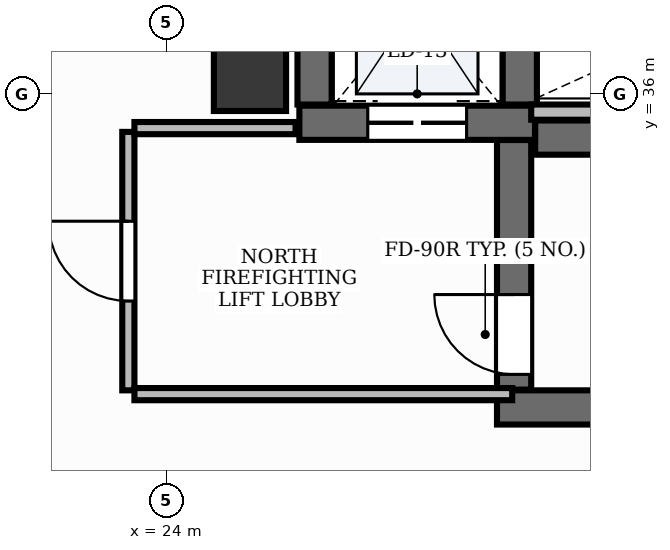
"""IFC4 building model, lengths in metres.
Left out: names, types, materials, properties, quantities, classifications, styles, units other than length and angle.
Written with IfcOpenShell. Run it as: python <this file> out.ifc"""

import sys

from ifc_helpers import new_model, si_unit, direction, frame, frame_2d, origin, origin_2d, place, context, subcontext, project, spatial, rectangle, extrude, element, fill, save


model = new_model("IFC4")
c1 = context("Model", 3, precision=1e-05, world=origin(), true_north=direction((0.0, 1.0)))
c2 = subcontext(c1, "Body", "Model", "MODEL_VIEW")
j1 = project(units=[si_unit("LENGTHUNIT", "METRE"), si_unit("PLANEANGLEUNIT", "RADIAN")], contexts=[c1])
p1 = place(None, origin())
s1 = spatial("IfcSite", under=j1, at=p1, CompositionType="ELEMENT")
p2 = place(p1, origin())
s2 = spatial("IfcBuilding", under=s1, at=p2, CompositionType="ELEMENT")
p3 = place(p2, frame((0.0, 0.0, 51.0)))
s3 = spatial("IfcBuildingStorey", under=s2, at=p3, CompositionType="ELEMENT", Elevation=51.0)
p4 = place(p3, frame((28.852, 35.425, 0.0), z_axis=(0.0, 0.0, 1.0), x_axis=(1.0, 0.0, 0.0)))
e1 = element("IfcWall", 1, at=p4, inside=s3, PredefinedType="SHEAR", context=c2, shape_type="SweptSolid", body=[
    extrude(rectangle(XDim=8.248, YDim=0.45, at=frame_2d((4.124, 0.0))), origin(), (0.0, 0.0, 1.0), 3.9),
])
p5 = place(p3, frame((28.35, 31.875, 0.0), z_axis=(0.0, 0.0, 1.0), x_axis=(1.0, 0.0, 0.0)))
e2 = element("IfcWall", 2, at=p5, inside=s3, PredefinedType="SHEAR", context=c2, shape_type="SweptSolid", body=[
    extrude(rectangle(XDim=8.75, YDim=0.45, at=frame_2d((4.375, 0.0))), origin(), (0.0, 0.0, 1.0), 3.9),
])
p6 = place(p3, frame((28.575, 32.11, 0.0), z_axis=(0.0, 0.0, 1.0), x_axis=(0.0, 1.0, 0.0)))
e3 = element("IfcWall", 3, at=p6, inside=s3, PredefinedType="SHEAR", context=c2, shape_type="SweptSolid", body=[
    extrude(rectangle(XDim=3.283, YDim=0.45, at=frame_2d((1.642, 0.0))), origin(), (0.0, 0.0, 1.0), 3.9),
])
p7 = place(p6, frame((0.2, 0.0, 0.0)))
e4 = element("IfcOpeningElement", 4, at=p7, cuts=e3, PredefinedType="OPENING", context=c2, shape_type="SweptSolid", body=[
    extrude(rectangle(XDim=1.05, YDim=2.15, at=frame_2d((0.525, 1.075))), frame((0.0, 0.24, 0.0), z_axis=(0.0, -1.0, 0.0), x_axis=(1.0, 0.0, 0.0)), (0.0, 0.0, 1.0), 0.48),
])
p8 = place(p3, frame((25.75, 35.62, 0.0), z_axis=(0.0, 0.0, 1.0), x_axis=(1.0, 0.0, 0.0)))
e5 = element("IfcWall", 5, at=p8, inside=s3, PredefinedType="SHEAR", context=c2, shape_type="SweptSolid", body=[
    extrude(rectangle(XDim=3.1, YDim=0.45, at=frame_2d((1.55, 0.0))), origin(), (0.0, 0.0, 1.0), 3.9),
])
p9 = place(p8, frame((0.9, 0.0, 0.0)))
e6 = element("IfcOpeningElement", 6, at=p9, cuts=e5, PredefinedType="OPENING", context=c2, shape_type="SweptSolid", body=[
    extrude(rectangle(XDim=1.3, YDim=2.2, at=frame_2d((0.65, 1.1))), frame((0.0, 0.24, 0.0), z_axis=(0.0, -1.0, 0.0), x_axis=(1.0, 0.0, 0.0)), (0.0, 0.0, 1.0), 0.48),
])
for number, where, z_axis, x_axis in (
    (7, (25.95, 35.86, 0.0), (0.0, 0.0, 1.0), (0.0, 1.0, 0.0)),
    (8, (28.65, 35.86, 0.0), (0.0, 0.0, 1.0), (0.0, 1.0, 0.0)),
):
    element("IfcWall", number, at=place(p3, frame(where, z_axis=z_axis, x_axis=x_axis)), inside=s3, PredefinedType="SHEAR", context=c2, shape_type="SweptSolid", body=[
        extrude(rectangle(XDim=2.7, YDim=0.45, at=frame_2d((1.35, 0.0))), origin(), (0.0, 0.0, 1.0), 3.9),
    ])
p10 = place(p3, frame((25.1, 36.25, -0.0), z_axis=(0.0, 0.0, 1.0), x_axis=(1.0, 0.0, 0.0)))
e9 = element("IfcColumn", 9, at=p10, inside=s3, PredefinedType="PILASTER", context=c2, shape_type="SweptSolid", body=[
    extrude(rectangle(XDim=0.95, YDim=0.95, at=origin_2d()), origin(), (0.0, 0.0, 1.0), 3.901),
])
p11 = place(p3, frame((28.8, 35.76, 0.0), z_axis=(0.0, 0.0, 1.0), x_axis=(1.0, 0.0, 0.0)))
e10 = element("IfcWall", 10, at=p11, inside=s3, PredefinedType="PARTITIONING", context=c2, shape_type="SweptSolid", body=[
    extrude(rectangle(XDim=4.57, YDim=0.2, at=frame_2d((2.285, 0.0))), origin(), (0.0, 0.0, 1.0), 2.91),
])
p12 = place(p3, frame((23.5, 32.1, 0.0), z_axis=(0.0, 0.0, 1.0), x_axis=(0.0, 1.0, 0.0)))
e11 = element("IfcWall", 11, at=p12, inside=s3, PredefinedType="PARTITIONING", context=c2, shape_type="SweptSolid", body=[
    extrude(rectangle(XDim=3.4, YDim=0.16, at=frame_2d((1.7, 0.0))), origin(), (0.0, 0.0, 1.0), 2.91),
])
p13 = place(p12, frame((1.175, 0.0, 0.0)))
e12 = element("IfcOpeningElement", 12, at=p13, cuts=e11, PredefinedType="OPENING", context=c2, shape_type="SweptSolid", body=[
    extrude(rectangle(XDim=1.05, YDim=2.15, at=frame_2d((0.525, 1.075))), frame((0.0, 0.095, 0.0), z_axis=(0.0, -1.0, 0.0), x_axis=(1.0, 0.0, 0.0)), (0.0, 0.0, 1.0), 0.19),
])
p14 = place(p3, frame((23.58, 32.05, 0.0), z_axis=(0.0, 0.0, 1.0), x_axis=(1.0, 0.0, 0.0)))
e13 = element("IfcWall", 13, at=p14, inside=s3, PredefinedType="PARTITIONING", context=c2, shape_type="SweptSolid", body=[
    extrude(rectangle(XDim=4.97, YDim=0.16, at=frame_2d((2.485, 0.0))), origin(), (0.0, 0.0, 1.0), 2.91),
])
p15 = place(p3, frame((23.58, 35.55, 0.0), z_axis=(0.0, 0.0, 1.0), x_axis=(1.0, 0.0, 0.0)))
e14 = element("IfcWall", 14, at=p15, inside=s3, PredefinedType="PARTITIONING", context=c2, shape_type="SweptSolid", body=[
    extrude(rectangle(XDim=2.12, YDim=0.16, at=frame_2d((1.06, 0.0))), origin(), (0.0, 0.0, 1.0), 2.91),
])
p16 = place(p7, origin())
e15 = element("IfcDoor", 15, at=p16, inside=s3, OperationType="SINGLE_SWING_RIGHT", PredefinedType="DOOR", context=c2, shape_type="SweptSolid", body=[
    extrude(rectangle(XDim=1.05, YDim=2.15, at=frame_2d((0.525, 1.075))), frame((0.0, 0.025, 0.0), z_axis=(0.0, -1.0, 0.0), x_axis=(1.0, 0.0, 0.0)), (0.0, 0.0, 1.0), 0.05),
])
fill(e4, e15)
p17 = place(p9, origin())
e16 = element("IfcDoor", 16, at=p17, inside=s3, OperationType="DOUBLE_DOOR_SLIDING", PredefinedType="DOOR", context=c2, shape_type="SweptSolid", body=[
    extrude(rectangle(XDim=1.3, YDim=2.2, at=frame_2d((0.65, 1.1))), frame((0.0, 0.025, 0.0), z_axis=(0.0, -1.0, 0.0), x_axis=(1.0, 0.0, 0.0)), (0.0, 0.0, 1.0), 0.05),
])
fill(e6, e16)
p18 = place(p13, origin())
e17 = element("IfcDoor", 17, at=p18, inside=s3, OperationType="SINGLE_SWING_RIGHT", PredefinedType="DOOR", context=c2, shape_type="SweptSolid", body=[
    extrude(rectangle(XDim=1.05, YDim=2.15, at=frame_2d((0.525, 1.075))), frame((0.0, 0.025, 0.0), z_axis=(0.0, -1.0, 0.0), x_axis=(1.0, 0.0, 0.0)), (0.0, 0.0, 1.0), 0.05),
])
fill(e12, e17)
save(model, sys.argv[1])
